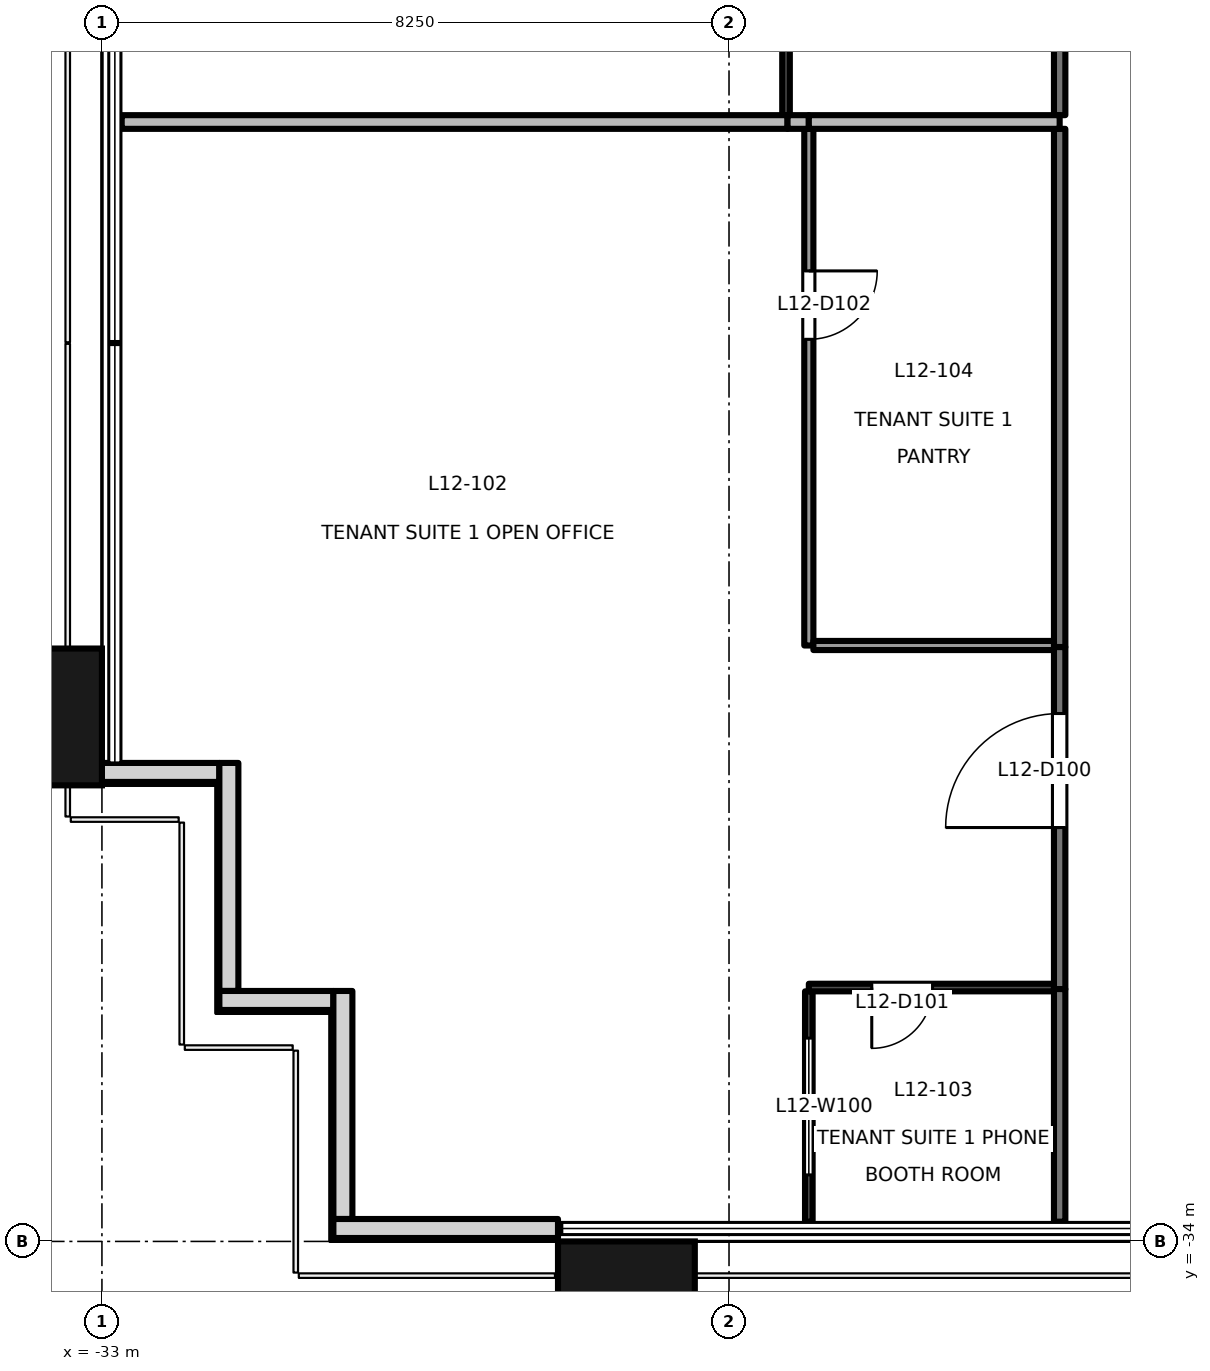
"""IFC4 building model, lengths in metres.
Left out: names, types, materials, properties, quantities, classifications, styles, units other than length and angle.
Written with IfcOpenShell. Run it as: python <this file> out.ifc"""

import sys

from ifc_helpers import new_model, si_unit, direction, frame, frame_2d, origin, origin_2d, place, context, subcontext, project, spatial, rectangle, extrude, element, fill, save


model = new_model("IFC4")
c1 = context("Model", 3, precision=1e-05, world=origin(), true_north=direction((0.0, 1.0)))
c2 = subcontext(c1, "Body", "Model", "MODEL_VIEW")
j1 = project(units=[si_unit("LENGTHUNIT", "METRE"), si_unit("PLANEANGLEUNIT", "RADIAN")], contexts=[c1])
p1 = place(None, origin())
s1 = spatial("IfcSite", under=j1, at=p1, CompositionType="ELEMENT")
p2 = place(p1, origin())
s2 = spatial("IfcBuilding", under=s1, at=p2, CompositionType="ELEMENT")
p3 = place(p2, frame((0.0, 0.0, 57.0)))
s3 = spatial("IfcBuildingStorey", under=s2, at=p3, CompositionType="ELEMENT", Elevation=57.0)
for number, where, z_axis, x_axis in (
    (1, (-26.1, -34.9, -0.2), (0.0, 0.0, 1.0), (1.0, 0.0, 0.0)),
    (2, (-33.9, -27.1, -0.2), (0.0, 0.0, 1.0), (0.0, 1.0, 0.0)),
):
    element("IfcColumn", number, at=place(p3, frame(where, z_axis=z_axis, x_axis=x_axis)), inside=s3, PredefinedType="COLUMN", context=c2, shape_type="SweptSolid", body=[
        extrude(rectangle(XDim=1.8, YDim=1.8, at=origin_2d()), origin(), (0.0, 0.0, 1.0), 4.1),
    ])
p4 = place(p3, frame((-33.005, -27.83, 0.0), z_axis=(0.0, 0.0, 1.0), x_axis=(1.0, 0.0, 0.0)))
e3 = element("IfcWall", 3, at=p4, inside=s3, PredefinedType="SOLIDWALL", context=c2, shape_type="SweptSolid", body=[
    extrude(rectangle(XDim=1.55, YDim=0.25, at=frame_2d((0.775, 0.0))), origin(), (0.0, 0.0, 1.0), 3.9),
])
p5 = place(p3, frame((-31.33, -27.705, 0.0), z_axis=(0.0, 0.0, 1.0), x_axis=(0.0, -1.0, 0.0)))
e4 = element("IfcWall", 4, at=p5, inside=s3, PredefinedType="SOLIDWALL", context=c2, shape_type="SweptSolid", body=[
    extrude(rectangle(XDim=3.0, YDim=0.25, at=frame_2d((1.5, 0.0))), origin(), (0.0, 0.0, 1.0), 3.9),
])
p6 = place(p3, frame((-31.455, -30.83, 0.0), z_axis=(0.0, 0.0, 1.0), x_axis=(1.0, 0.0, 0.0)))
e5 = element("IfcWall", 5, at=p6, inside=s3, PredefinedType="SOLIDWALL", context=c2, shape_type="SweptSolid", body=[
    extrude(rectangle(XDim=1.5, YDim=0.25, at=frame_2d((0.75, 0.0))), origin(), (0.0, 0.0, 1.0), 3.9),
])
p7 = place(p3, frame((-29.83, -30.705, 0.0), z_axis=(0.0, 0.0, 1.0), x_axis=(0.0, -1.0, 0.0)))
e6 = element("IfcWall", 6, at=p7, inside=s3, PredefinedType="SOLIDWALL", context=c2, shape_type="SweptSolid", body=[
    extrude(rectangle(XDim=3.0, YDim=0.25, at=frame_2d((1.5, 0.0))), origin(), (0.0, 0.0, 1.0), 3.9),
])
p8 = place(p3, frame((-29.955, -33.83, 0.0), z_axis=(0.0, 0.0, 1.0), x_axis=(1.0, 0.0, 0.0)))
e7 = element("IfcWall", 7, at=p8, inside=s3, PredefinedType="SOLIDWALL", context=c2, shape_type="SweptSolid", body=[
    extrude(rectangle(XDim=2.955, YDim=0.25, at=frame_2d((1.478, 0.0))), origin(), (0.0, 0.0, 1.0), 3.9),
])
p9 = place(p3, frame((-20.4, -30.68, 0.0), z_axis=(0.0, 0.0, 1.0), x_axis=(0.0, 1.0, 0.0)))
e8 = element("IfcWall", 8, at=p9, inside=s3, PredefinedType="PARTITIONING", context=c2, shape_type="SweptSolid", body=[
    extrude(rectangle(XDim=4.5, YDim=0.15, at=frame_2d((2.25, 0.0))), origin(), (0.0, 0.0, 1.0), 3.3),
])
p10 = place(p9, frame((2.125, 0.0, 0.0)))
e9 = element("IfcOpeningElement", 9, at=p10, cuts=e8, PredefinedType="OPENING", context=c2, shape_type="SweptSolid", body=[
    extrude(rectangle(XDim=1.5, YDim=2.1, at=frame_2d((0.75, 1.05))), frame((0.0, 0.085, 0.0), z_axis=(0.0, -1.0, 0.0), x_axis=(1.0, 0.0, 0.0)), (0.0, 0.0, 1.0), 0.171),
])
p11 = place(p3, frame((-20.4, -33.74, 0.0), z_axis=(0.0, 0.0, 1.0), x_axis=(0.0, 1.0, 0.0)))
e10 = element("IfcWall", 10, at=p11, inside=s3, PredefinedType="PARTITIONING", context=c2, shape_type="SweptSolid", body=[
    extrude(rectangle(XDim=3.06, YDim=0.15, at=frame_2d((1.53, 0.0))), origin(), (0.0, 0.0, 1.0), 3.9),
])
p12 = place(p3, frame((-20.4, -26.18, 0.0), z_axis=(0.0, 0.0, 1.0), x_axis=(0.0, 1.0, 0.0)))
e11 = element("IfcWall", 11, at=p12, inside=s3, PredefinedType="PARTITIONING", context=c2, shape_type="SweptSolid", body=[
    extrude(rectangle(XDim=6.817, YDim=0.15, at=frame_2d((3.408, 0.0))), origin(), (0.0, 0.0, 1.0), 3.3),
])
p13 = place(p3, frame((-20.4, -19.183, 0.0), z_axis=(0.0, 0.0, 1.0), x_axis=(0.0, 1.0, 0.0)))
e12 = element("IfcWall", 12, at=p13, inside=s3, PredefinedType="PARTITIONING", context=c2, shape_type="SweptSolid", body=[
    extrude(rectangle(XDim=5.93, YDim=0.15, at=frame_2d((2.965, 0.0))), origin(), (0.0, 0.0, 1.0), 3.3),
])
p14 = place(p3, frame((-23.7, -30.71, 0.0), z_axis=(0.0, 0.0, 1.0), x_axis=(0.0, -1.0, 0.0)))
e13 = element("IfcWall", 13, at=p14, inside=s3, PredefinedType="PARTITIONING", context=c2, shape_type="SweptSolid", body=[
    extrude(rectangle(XDim=3.03, YDim=0.1, at=frame_2d((1.515, 0.0))), origin(), (0.0, 0.0, 1.0), 3.9),
])
p15 = place(p14, frame((0.615, 0.0, 0.9)))
e14 = element("IfcOpeningElement", 14, at=p15, cuts=e13, PredefinedType="OPENING", context=c2, shape_type="SweptSolid", body=[
    extrude(rectangle(XDim=1.8, YDim=1.2, at=frame_2d((0.9, 0.6))), frame((0.0, 0.061, 0.0), z_axis=(0.0, -1.0, 0.0), x_axis=(1.0, 0.0, 0.0)), (0.0, 0.0, 1.0), 0.121),
])
p16 = place(p3, frame((-20.475, -30.66, 0.0), z_axis=(0.0, 0.0, 1.0), x_axis=(-1.0, 0.0, 0.0)))
e15 = element("IfcWall", 15, at=p16, inside=s3, PredefinedType="PARTITIONING", context=c2, shape_type="SweptSolid", body=[
    extrude(rectangle(XDim=3.225, YDim=0.1, at=frame_2d((1.612, 0.0))), origin(), (0.0, 0.0, 1.0), 3.9),
])
p17 = place(p16, frame((1.597, 0.0, 0.0)))
e16 = element("IfcOpeningElement", 16, at=p17, cuts=e15, PredefinedType="OPENING", context=c2, shape_type="SweptSolid", body=[
    extrude(rectangle(XDim=0.8, YDim=2.1, at=frame_2d((0.4, 1.05))), frame((0.0, 0.061, 0.0), z_axis=(0.0, -1.0, 0.0), x_axis=(1.0, 0.0, 0.0)), (0.0, 0.0, 1.0), 0.121),
])
p18 = place(p3, frame((-23.7, -19.363, 0.0), z_axis=(0.0, 0.0, 1.0), x_axis=(0.0, -1.0, 0.0)))
e17 = element("IfcWall", 17, at=p18, inside=s3, PredefinedType="PARTITIONING", context=c2, shape_type="SweptSolid", body=[
    extrude(rectangle(XDim=6.797, YDim=0.12, at=frame_2d((3.398, 0.0))), origin(), (0.0, 0.0, 1.0), 3.3),
])
p19 = place(p18, frame((1.869, 0.0, 0.0)))
e18 = element("IfcOpeningElement", 18, at=p19, cuts=e17, PredefinedType="OPENING", context=c2, shape_type="SweptSolid", body=[
    extrude(rectangle(XDim=0.9, YDim=2.1, at=frame_2d((0.45, 1.05))), frame((0.0, 0.071, 0.0), z_axis=(0.0, -1.0, 0.0), x_axis=(1.0, 0.0, 0.0)), (0.0, 0.0, 1.0), 0.141),
])
p20 = place(p3, frame((-23.64, -26.16, 0.0), z_axis=(0.0, 0.0, 1.0), x_axis=(1.0, 0.0, 0.0)))
e19 = element("IfcWall", 19, at=p20, inside=s3, PredefinedType="PARTITIONING", context=c2, shape_type="SweptSolid", body=[
    extrude(rectangle(XDim=3.165, YDim=0.12, at=frame_2d((1.583, 0.0))), origin(), (0.0, 0.0, 1.0), 3.9),
])
p21 = place(p3, frame((-32.74, -19.273, 0.0), z_axis=(0.0, 0.0, 1.0), x_axis=(1.0, 0.0, 0.0)))
e20 = element("IfcWall", 20, at=p21, inside=s3, PredefinedType="PARTITIONING", context=c2, shape_type="SweptSolid", body=[
    extrude(rectangle(XDim=8.76, YDim=0.18, at=frame_2d((4.38, 0.0))), origin(), (0.0, 0.0, 1.0), 3.9),
])
p22 = place(p3, frame((-23.98, -19.273, 0.0), z_axis=(0.0, 0.0, 1.0), x_axis=(1.0, 0.0, 0.0)))
e21 = element("IfcWall", 21, at=p22, inside=s3, PredefinedType="PARTITIONING", context=c2, shape_type="SweptSolid", body=[
    extrude(rectangle(XDim=0.28, YDim=0.18, at=frame_2d((0.14, 0.0))), origin(), (0.0, 0.0, 1.0), 3.9),
])
p23 = place(p3, frame((-23.7, -19.273, 0.0), z_axis=(0.0, 0.0, 1.0), x_axis=(1.0, 0.0, 0.0)))
e22 = element("IfcWall", 22, at=p23, inside=s3, PredefinedType="PARTITIONING", context=c2, shape_type="SweptSolid", body=[
    extrude(rectangle(XDim=3.3, YDim=0.18, at=frame_2d((1.65, 0.0))), origin(), (0.0, 0.0, 1.0), 3.9),
])
p24 = place(p3, frame((-24.0, -13.273, 0.0), z_axis=(0.0, 0.0, 1.0), x_axis=(0.0, -1.0, 0.0)))
e23 = element("IfcWall", 23, at=p24, inside=s3, PredefinedType="PARTITIONING", context=c2, shape_type="SweptSolid", body=[
    extrude(rectangle(XDim=5.91, YDim=0.1, at=frame_2d((2.955, 0.0))), origin(), (0.0, 0.0, 1.0), 3.3),
])
p25 = place(p24, frame((1.633, 0.0, 0.0)))
e24 = element("IfcOpeningElement", 24, at=p25, cuts=e23, PredefinedType="OPENING", context=c2, shape_type="SweptSolid", body=[
    extrude(rectangle(XDim=0.8, YDim=2.1, at=frame_2d((0.4, 1.05))), frame((0.0, 0.061, 0.0), z_axis=(0.0, -1.0, 0.0), x_axis=(1.0, 0.0, 0.0)), (0.0, 0.0, 1.0), 0.121),
])
p26 = place(p10, origin())
e25 = element("IfcDoor", 25, at=p26, inside=s3, OperationType="DOUBLE_DOOR_SINGLE_SWING", PredefinedType="DOOR", context=c2, shape_type="SweptSolid", body=[
    extrude(rectangle(XDim=1.5, YDim=2.1, at=frame_2d((0.75, 1.05))), frame((0.0, 0.025, 0.0), z_axis=(0.0, -1.0, 0.0), x_axis=(1.0, 0.0, 0.0)), (0.0, 0.0, 1.0), 0.05),
])
fill(e9, e25)
p27 = place(p17, origin())
e26 = element("IfcDoor", 26, at=p27, inside=s3, OperationType="SINGLE_SWING_RIGHT", PredefinedType="DOOR", context=c2, shape_type="SweptSolid", body=[
    extrude(rectangle(XDim=0.8, YDim=2.1, at=frame_2d((0.4, 1.05))), frame((0.0, 0.025, 0.0), z_axis=(0.0, -1.0, 0.0), x_axis=(1.0, 0.0, 0.0)), (0.0, 0.0, 1.0), 0.05),
])
fill(e16, e26)
p28 = place(p19, origin())
e27 = element("IfcDoor", 27, at=p28, inside=s3, OperationType="SINGLE_SWING_LEFT", PredefinedType="DOOR", context=c2, shape_type="SweptSolid", body=[
    extrude(rectangle(XDim=0.9, YDim=2.1, at=frame_2d((0.45, 1.05))), frame((0.0, 0.025, 0.0), z_axis=(0.0, -1.0, 0.0), x_axis=(1.0, 0.0, 0.0)), (0.0, 0.0, 1.0), 0.05),
])
fill(e18, e27)
p29 = place(p15, origin())
e28 = element("IfcWindow", 28, at=p29, inside=s3, PartitioningType="SINGLE_PANEL", PredefinedType="WINDOW", context=c2, shape_type="SweptSolid", body=[
    extrude(rectangle(XDim=1.8, YDim=1.2, at=frame_2d((0.9, 0.6))), frame((0.0, 0.03, 0.0), z_axis=(0.0, -1.0, 0.0), x_axis=(1.0, 0.0, 0.0)), (0.0, 0.0, 1.0), 0.06),
])
fill(e14, e28)
save(model, sys.argv[1])
